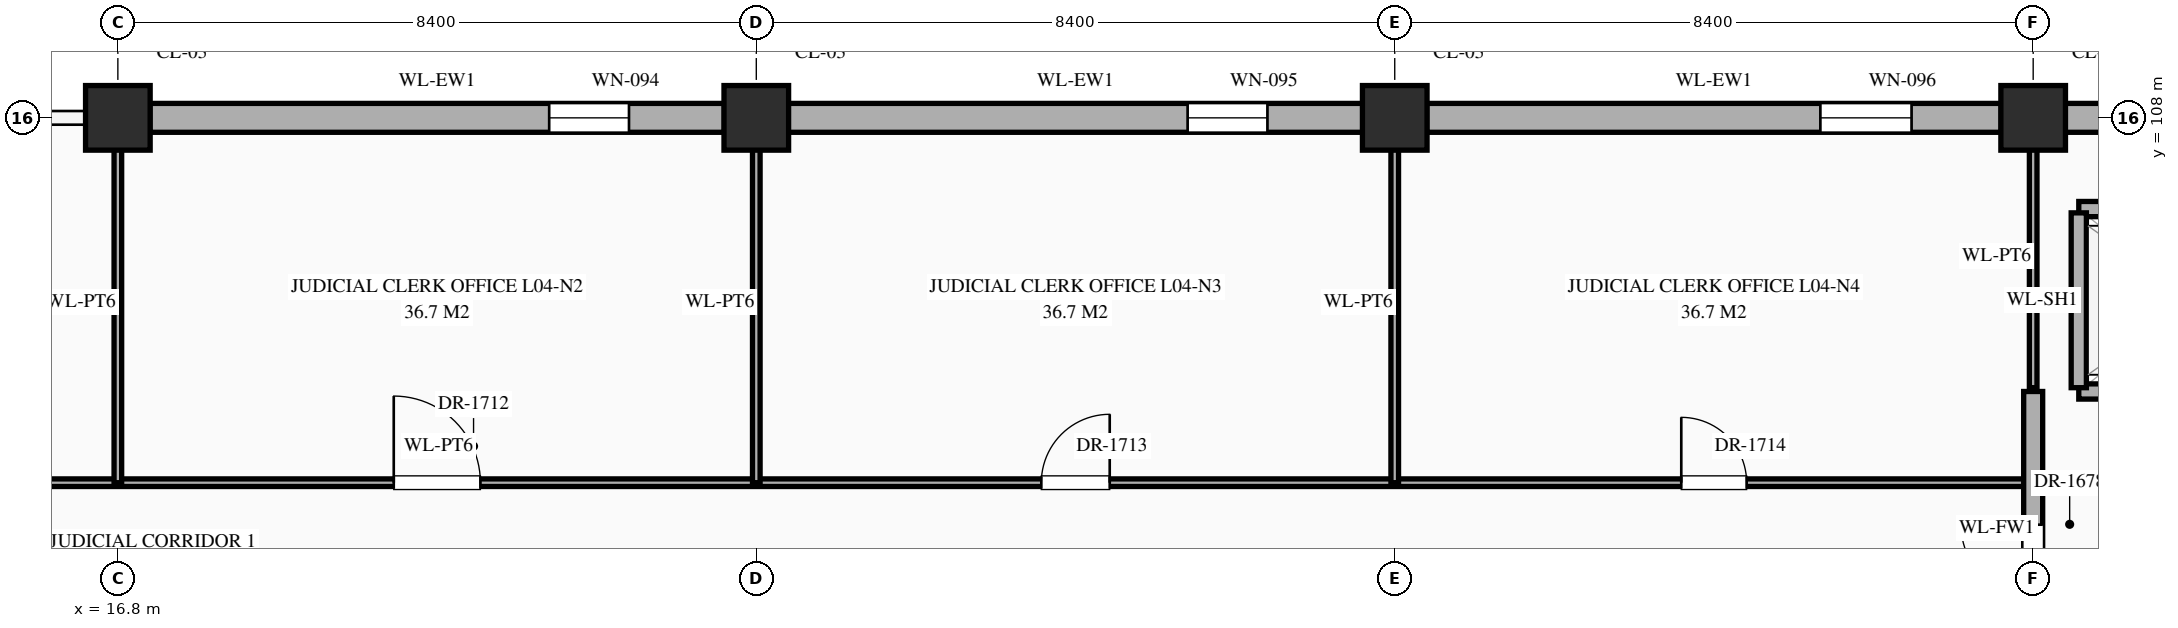
"""IFC4 building model, lengths in metres.
Left out: names, types, materials, properties, quantities, classifications, styles, units other than length and angle.
Written with IfcOpenShell. Run it as: python <this file> out.ifc"""

import sys

from ifc_helpers import new_model, si_unit, direction, frame, frame_2d, origin, origin_2d, place, context, subcontext, project, spatial, rectangle, extrude, element, fill, save


model = new_model("IFC4")
c1 = context("Model", 3, precision=1e-05, world=origin(), true_north=direction((0.0, 1.0)))
c2 = subcontext(c1, "Body", "Model", "MODEL_VIEW")
j1 = project(units=[si_unit("LENGTHUNIT", "METRE"), si_unit("PLANEANGLEUNIT", "RADIAN")], contexts=[c1])
p1 = place(None, origin())
s1 = spatial("IfcSite", under=j1, at=p1, CompositionType="ELEMENT")
p2 = place(p1, origin())
s2 = spatial("IfcBuilding", under=s1, at=p2, CompositionType="ELEMENT")
p3 = place(p2, frame((0.0, 0.0, 16.2)))
s3 = spatial("IfcBuildingStorey", under=s2, at=p3, CompositionType="ELEMENT", Elevation=16.2)
for number, where, z_axis, x_axis in (
    (1, (16.8, 108.0, 0.0), (0.0, 0.0, 1.0), (1.0, 0.0, 0.0)),
    (2, (25.2, 108.0, 0.0), (0.0, 0.0, 1.0), (1.0, 0.0, 0.0)),
    (3, (33.6, 108.0, 0.0), (0.0, 0.0, 1.0), (1.0, 0.0, 0.0)),
    (4, (42.0, 108.0, 0.0), (0.0, 0.0, 1.0), (1.0, 0.0, 0.0)),
):
    element("IfcColumn", number, at=place(p3, frame(where, z_axis=z_axis, x_axis=x_axis)), inside=s3, PredefinedType="COLUMN", context=c2, shape_type="SweptSolid", body=[
        extrude(rectangle(XDim=0.85, YDim=0.85, at=origin_2d()), origin(), (0.0, 0.0, 1.0), 5.4),
    ])
p4 = place(p3, frame((17.22, 108.0, 0.0), z_axis=(0.0, 0.0, 1.0), x_axis=(1.0, 0.0, 0.0)))
e5 = element("IfcWall", 5, at=p4, inside=s3, PredefinedType="STANDARD", context=c2, shape_type="SweptSolid", body=[
    extrude(rectangle(XDim=7.56, YDim=0.38, at=frame_2d((3.78, 0.0))), origin(), (0.0, 0.0, 1.0), 4.4),
])
p5 = place(p4, frame((5.255, 0.0, 0.85)))
e6 = element("IfcOpeningElement", 6, at=p5, cuts=e5, PredefinedType="OPENING", context=c2, shape_type="SweptSolid", body=[
    extrude(rectangle(XDim=1.05, YDim=1.92, at=frame_2d((0.525, 0.96))), frame((0.0, 0.202, 0.0), z_axis=(0.0, -1.0, 0.0), x_axis=(1.0, 0.0, 0.0)), (0.0, 0.0, 1.0), 0.404),
])
p6 = place(p3, frame((25.62, 108.0, 0.0), z_axis=(0.0, 0.0, 1.0), x_axis=(1.0, 0.0, 0.0)))
e7 = element("IfcWall", 7, at=p6, inside=s3, PredefinedType="STANDARD", context=c2, shape_type="SweptSolid", body=[
    extrude(rectangle(XDim=7.56, YDim=0.38, at=frame_2d((3.78, 0.0))), origin(), (0.0, 0.0, 1.0), 4.47),
])
p7 = place(p6, frame((5.255, 0.0, 0.85)))
e8 = element("IfcOpeningElement", 8, at=p7, cuts=e7, PredefinedType="OPENING", context=c2, shape_type="SweptSolid", body=[
    extrude(rectangle(XDim=1.05, YDim=2.12, at=frame_2d((0.525, 1.06))), frame((0.0, 0.202, 0.0), z_axis=(0.0, -1.0, 0.0), x_axis=(1.0, 0.0, 0.0)), (0.0, 0.0, 1.0), 0.404),
])
p8 = place(p3, frame((34.02, 108.0, 0.0), z_axis=(0.0, 0.0, 1.0), x_axis=(1.0, 0.0, 0.0)))
e9 = element("IfcWall", 9, at=p8, inside=s3, PredefinedType="STANDARD", context=c2, shape_type="SweptSolid", body=[
    extrude(rectangle(XDim=7.56, YDim=0.38, at=frame_2d((3.78, 0.0))), origin(), (0.0, 0.0, 1.0), 4.47),
])
p9 = place(p8, frame((5.18, 0.0, 0.85)))
e10 = element("IfcOpeningElement", 10, at=p9, cuts=e9, PredefinedType="OPENING", context=c2, shape_type="SweptSolid", body=[
    extrude(rectangle(XDim=1.2, YDim=1.2, at=frame_2d((0.6, 0.6))), frame((0.0, 0.202, 0.0), z_axis=(0.0, -1.0, 0.0), x_axis=(1.0, 0.0, 0.0)), (0.0, 0.0, 1.0), 0.404),
])
p10 = place(p3, frame((42.42, 108.0, 0.0), z_axis=(0.0, 0.0, 1.0), x_axis=(1.0, 0.0, 0.0)))
e11 = element("IfcWall", 11, at=p10, inside=s3, PredefinedType="STANDARD", context=c2, shape_type="SweptSolid", body=[
    extrude(rectangle(XDim=7.535, YDim=0.38, at=frame_2d((3.768, 0.0))), origin(), (0.0, 0.0, 1.0), 4.47),
])
p11 = place(p3, frame((0.04, 103.2, 0.0), z_axis=(0.0, 0.0, 1.0), x_axis=(1.0, 0.0, 0.0)))
e12 = element("IfcWall", 12, at=p11, inside=s3, PredefinedType="STANDARD", context=c2, shape_type="SweptSolid", body=[
    extrude(rectangle(XDim=41.96, YDim=0.1, at=frame_2d((20.98, 0.0))), origin(), (0.0, 0.0, 1.0), 5.05),
])
p12 = place(p11, frame((3.67, 0.0, 0.0)))
e13 = element("IfcOpeningElement", 13, at=p12, cuts=e12, PredefinedType="OPENING", context=c2, shape_type="SweptSolid", body=[
    extrude(rectangle(XDim=1.02, YDim=2.4, at=frame_2d((0.51, 1.2))), frame((0.0, 0.062, 0.0), z_axis=(0.0, -1.0, 0.0), x_axis=(1.0, 0.0, 0.0)), (0.0, 0.0, 1.0), 0.124),
])
p13 = place(p11, frame((12.03, 0.0, 0.0)))
e14 = element("IfcOpeningElement", 14, at=p13, cuts=e12, PredefinedType="OPENING", context=c2, shape_type="SweptSolid", body=[
    extrude(rectangle(XDim=1.06, YDim=2.4, at=frame_2d((0.53, 1.2))), frame((0.0, 0.062, 0.0), z_axis=(0.0, -1.0, 0.0), x_axis=(1.0, 0.0, 0.0)), (0.0, 0.0, 1.0), 0.124),
])
p14 = place(p11, frame((20.39, 0.0, 0.0)))
e15 = element("IfcOpeningElement", 15, at=p14, cuts=e12, PredefinedType="OPENING", context=c2, shape_type="SweptSolid", body=[
    extrude(rectangle(XDim=1.14, YDim=2.4, at=frame_2d((0.57, 1.2))), frame((0.0, 0.062, 0.0), z_axis=(0.0, -1.0, 0.0), x_axis=(1.0, 0.0, 0.0)), (0.0, 0.0, 1.0), 0.124),
])
p15 = place(p11, frame((28.91, 0.0, 0.0)))
e16 = element("IfcOpeningElement", 16, at=p15, cuts=e12, PredefinedType="OPENING", context=c2, shape_type="SweptSolid", body=[
    extrude(rectangle(XDim=0.9, YDim=2.15, at=frame_2d((0.45, 1.075))), frame((0.0, 0.062, 0.0), z_axis=(0.0, -1.0, 0.0), x_axis=(1.0, 0.0, 0.0)), (0.0, 0.0, 1.0), 0.124),
])
p16 = place(p11, frame((37.33, 0.0, 0.0)))
e17 = element("IfcOpeningElement", 17, at=p16, cuts=e12, PredefinedType="OPENING", context=c2, shape_type="SweptSolid", body=[
    extrude(rectangle(XDim=0.86, YDim=2.1, at=frame_2d((0.43, 1.05))), frame((0.0, 0.062, 0.0), z_axis=(0.0, -1.0, 0.0), x_axis=(1.0, 0.0, 0.0)), (0.0, 0.0, 1.0), 0.124),
])
p17 = place(p3, frame((42.6, 104.4, 0.0), z_axis=(0.0, 0.0, 1.0), x_axis=(1.0, 0.0, 0.0)))
e18 = element("IfcWall", 18, at=p17, inside=s3, PredefinedType="STANDARD", context=c2, shape_type="SweptSolid", body=[
    extrude(rectangle(XDim=3.0, YDim=0.2, at=frame_2d((1.5, 0.0))), origin(), (0.0, 0.0, 1.0), 5.12),
])
p18 = place(p17, frame((0.9, 0.0, 0.0)))
e19 = element("IfcOpeningElement", 19, at=p18, cuts=e18, PredefinedType="OPENING", context=c2, shape_type="SweptSolid", body=[
    extrude(rectangle(XDim=1.2, YDim=2.15, at=frame_2d((0.6, 1.075))), frame((0.0, 0.112, 0.0), z_axis=(0.0, -1.0, 0.0), x_axis=(1.0, 0.0, 0.0)), (0.0, 0.0, 1.0), 0.224),
])
p19 = place(p3, frame((42.6, 106.8, 0.0), z_axis=(0.0, 0.0, 1.0), x_axis=(1.0, 0.0, 0.0)))
e20 = element("IfcWall", 20, at=p19, inside=s3, PredefinedType="STANDARD", context=c2, shape_type="SweptSolid", body=[
    extrude(rectangle(XDim=3.0, YDim=0.2, at=frame_2d((1.5, 0.0))), origin(), (0.0, 0.0, 1.0), 5.12),
])
for number, where, z_axis, x_axis in (
    (21, (16.8, 103.2, 0.0), (0.0, 0.0, 1.0), (0.0, 1.0, 0.0)),
    (22, (25.2, 103.2, 0.0), (0.0, 0.0, 1.0), (0.0, 1.0, 0.0)),
):
    element("IfcWall", number, at=place(p3, frame(where, z_axis=z_axis, x_axis=x_axis)), inside=s3, PredefinedType="STANDARD", context=c2, shape_type="SweptSolid", body=[
        extrude(rectangle(XDim=4.76, YDim=0.1, at=frame_2d((2.38, 0.0))), origin(), (0.0, 0.0, 1.0), 4.3),
    ])
p20 = place(p3, frame((33.6, 103.2, 0.0), z_axis=(0.0, 0.0, 1.0), x_axis=(0.0, 1.0, 0.0)))
e23 = element("IfcWall", 23, at=p20, inside=s3, PredefinedType="STANDARD", context=c2, shape_type="SweptSolid", body=[
    extrude(rectangle(XDim=4.76, YDim=0.1, at=frame_2d((2.38, 0.0))), origin(), (0.0, 0.0, 1.0), 4.37),
])
p21 = place(p3, frame((42.0, 100.8, 0.0), z_axis=(0.0, 0.0, 1.0), x_axis=(0.0, 1.0, 0.0)))
e24 = element("IfcWall", 24, at=p21, inside=s3, PredefinedType="STANDARD", context=c2, shape_type="SweptSolid", body=[
    extrude(rectangle(XDim=3.6, YDim=0.25, at=frame_2d((1.8, 0.0))), origin(), (0.0, 0.0, 1.0), 4.37),
])
p22 = place(p21, frame((0.897, 0.0, 0.0)))
e25 = element("IfcOpeningElement", 25, at=p22, cuts=e24, PredefinedType="OPENING", context=c2, shape_type="SweptSolid", body=[
    extrude(rectangle(XDim=0.95, YDim=2.15, at=frame_2d((0.475, 1.075))), frame((0.0, 0.137, 0.0), z_axis=(0.0, -1.0, 0.0), x_axis=(1.0, 0.0, 0.0)), (0.0, 0.0, 1.0), 0.274),
])
p23 = place(p3, frame((42.0, 104.45, 0.0), z_axis=(0.0, 0.0, 1.0), x_axis=(0.0, 1.0, 0.0)))
e26 = element("IfcWall", 26, at=p23, inside=s3, PredefinedType="STANDARD", context=c2, shape_type="SweptSolid", body=[
    extrude(rectangle(XDim=3.46, YDim=0.1, at=frame_2d((1.73, 0.0))), origin(), (0.0, 0.0, 1.0), 4.37),
])
p24 = place(p3, frame((42.6, 104.45, 0.0), z_axis=(0.0, 0.0, 1.0), x_axis=(0.0, 1.0, 0.0)))
e27 = element("IfcWall", 27, at=p24, inside=s3, PredefinedType="STANDARD", context=c2, shape_type="SweptSolid", body=[
    extrude(rectangle(XDim=2.3, YDim=0.2, at=frame_2d((1.15, 0.0))), origin(), (0.0, 0.0, 1.0), 5.12),
])
p25 = place(p5, origin())
e28 = element("IfcWindow", 28, at=p25, inside=s3, PartitioningType="SINGLE_PANEL", PredefinedType="WINDOW", context=c2, shape_type="SweptSolid", body=[
    extrude(rectangle(XDim=1.05, YDim=1.92, at=frame_2d((0.525, 0.96))), frame((0.0, 0.03, 0.0), z_axis=(0.0, -1.0, 0.0), x_axis=(1.0, 0.0, 0.0)), (0.0, 0.0, 1.0), 0.06),
])
fill(e6, e28)
p26 = place(p7, origin())
e29 = element("IfcWindow", 29, at=p26, inside=s3, PartitioningType="SINGLE_PANEL", PredefinedType="WINDOW", context=c2, shape_type="SweptSolid", body=[
    extrude(rectangle(XDim=1.05, YDim=2.12, at=frame_2d((0.525, 1.06))), frame((0.0, 0.03, 0.0), z_axis=(0.0, -1.0, 0.0), x_axis=(1.0, 0.0, 0.0)), (0.0, 0.0, 1.0), 0.06),
])
fill(e8, e29)
p27 = place(p9, origin())
e30 = element("IfcWindow", 30, at=p27, inside=s3, PartitioningType="SINGLE_PANEL", PredefinedType="WINDOW", context=c2, shape_type="SweptSolid", body=[
    extrude(rectangle(XDim=1.2, YDim=1.2, at=frame_2d((0.6, 0.6))), frame((0.0, 0.03, 0.0), z_axis=(0.0, -1.0, 0.0), x_axis=(1.0, 0.0, 0.0)), (0.0, 0.0, 1.0), 0.06),
])
fill(e10, e30)
p28 = place(p22, origin())
e31 = element("IfcDoor", 31, at=p28, inside=s3, OperationType="SINGLE_SWING_RIGHT", PredefinedType="DOOR", context=c2, shape_type="SweptSolid", body=[
    extrude(rectangle(XDim=0.95, YDim=2.15, at=frame_2d((0.475, 1.075))), frame((0.0, 0.025, 0.0), z_axis=(0.0, -1.0, 0.0), x_axis=(1.0, 0.0, 0.0)), (0.0, 0.0, 1.0), 0.05),
])
fill(e25, e31)
p29 = place(p14, origin())
e32 = element("IfcDoor", 32, at=p29, inside=s3, OperationType="SINGLE_SWING_LEFT", PredefinedType="DOOR", context=c2, shape_type="SweptSolid", body=[
    extrude(rectangle(XDim=1.14, YDim=2.4, at=frame_2d((0.57, 1.2))), frame((0.0, 0.025, 0.0), z_axis=(0.0, -1.0, 0.0), x_axis=(1.0, 0.0, 0.0)), (0.0, 0.0, 1.0), 0.05),
])
fill(e15, e32)
p30 = place(p15, origin())
e33 = element("IfcDoor", 33, at=p30, inside=s3, OperationType="SINGLE_SWING_RIGHT", PredefinedType="DOOR", context=c2, shape_type="SweptSolid", body=[
    extrude(rectangle(XDim=0.9, YDim=2.15, at=frame_2d((0.45, 1.075))), frame((0.0, 0.025, 0.0), z_axis=(0.0, -1.0, 0.0), x_axis=(1.0, 0.0, 0.0)), (0.0, 0.0, 1.0), 0.05),
])
fill(e16, e33)
p31 = place(p16, origin())
e34 = element("IfcDoor", 34, at=p31, inside=s3, OperationType="SINGLE_SWING_LEFT", PredefinedType="DOOR", context=c2, shape_type="SweptSolid", body=[
    extrude(rectangle(XDim=0.86, YDim=2.1, at=frame_2d((0.43, 1.05))), frame((0.0, 0.025, 0.0), z_axis=(0.0, -1.0, 0.0), x_axis=(1.0, 0.0, 0.0)), (0.0, 0.0, 1.0), 0.05),
])
fill(e17, e34)
save(model, sys.argv[1])
